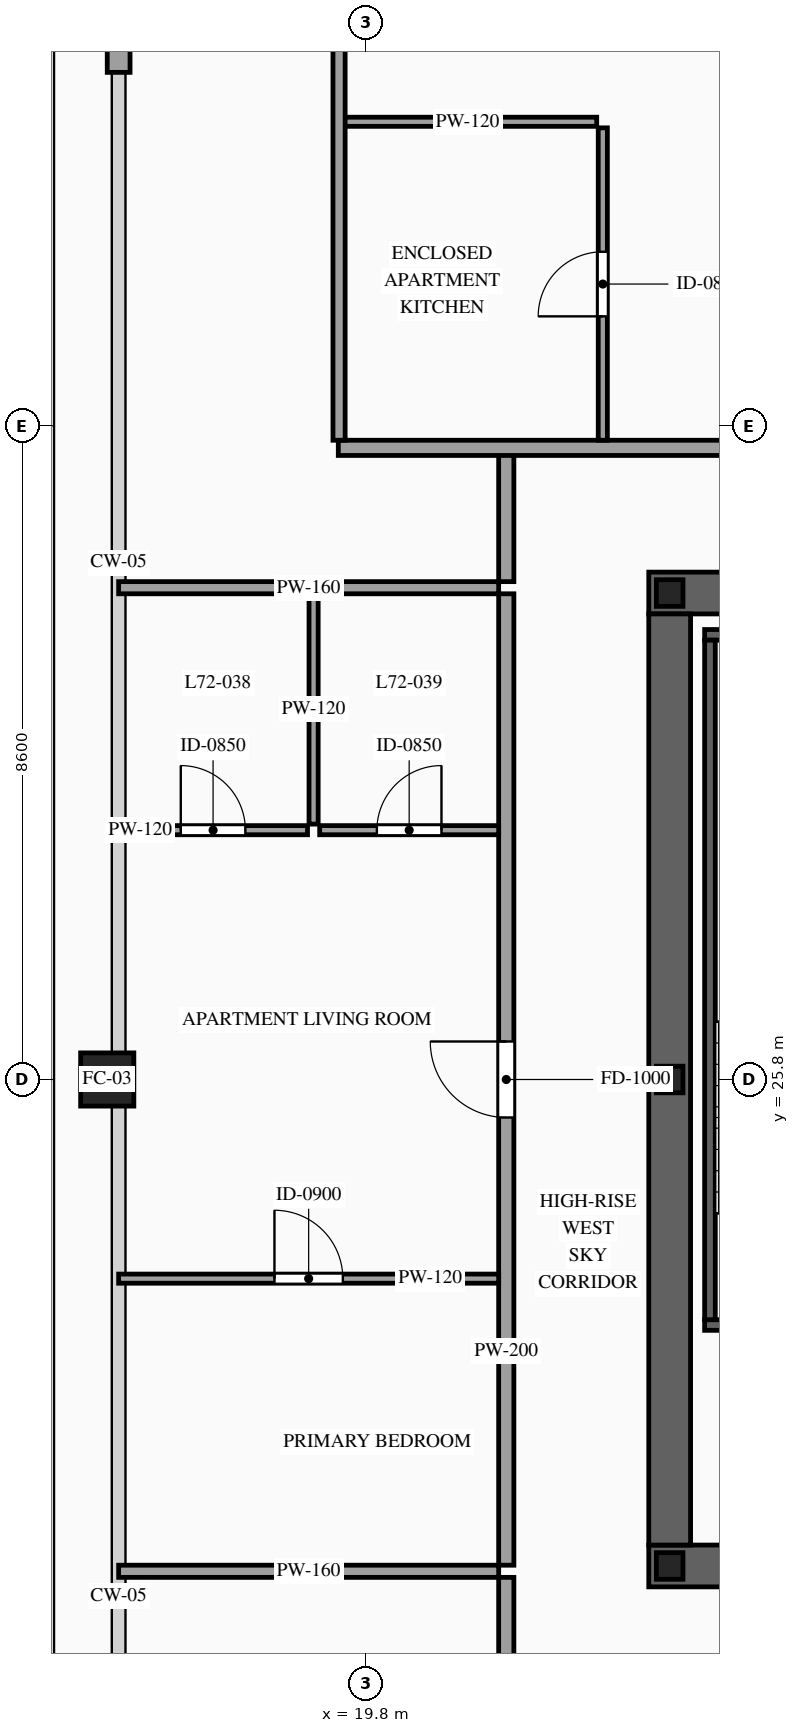
"""IFC4 building model, lengths in metres.
Left out: names, types, materials, properties, quantities, classifications, styles, units other than length and angle.
Written with IfcOpenShell. Run it as: python <this file> out.ifc"""

import sys

from ifc_helpers import new_model, si_unit, direction, frame, frame_2d, origin, origin_2d, place, context, subcontext, project, spatial, rectangle, hollow_rectangle, i_section, extrude, source, transform, mapped, element, fill, save


model = new_model("IFC4")
c1 = context("Model", 3, precision=1e-05, world=origin(), true_north=direction((0.0, 1.0)))
c2 = subcontext(c1, "Body", "Model", "MODEL_VIEW")
j1 = project(units=[si_unit("LENGTHUNIT", "METRE"), si_unit("PLANEANGLEUNIT", "RADIAN")], contexts=[c1])
p1 = place(None, origin())
s1 = spatial("IfcSite", under=j1, at=p1, CompositionType="ELEMENT")
p2 = place(p1, origin())
s2 = spatial("IfcBuilding", under=s1, at=p2, CompositionType="ELEMENT")
p3 = place(p2, frame((0.0, 0.0, 271.6)))
s3 = spatial("IfcBuildingStorey", under=s2, at=p3, CompositionType="ELEMENT", Elevation=271.6)
p4 = place(p3, frame((23.525, 19.4, 0.0), z_axis=(0.0, 0.0, 1.0), x_axis=(1.0, 0.0, 0.0)))
e1 = element("IfcWall", 1, at=p4, inside=s3, PredefinedType="SHEAR", context=c2, shape_type="SweptSolid", body=[
    extrude(rectangle(XDim=26.95, YDim=0.55, at=frame_2d((13.475, 0.0))), origin(), (0.0, 0.0, 1.0), 3.5),
])
p5 = place(p4, frame((1.925, 0.0, 0.0)))
e2 = element("IfcOpeningElement", 2, at=p5, cuts=e1, PredefinedType="OPENING", context=c2, shape_type="SweptSolid", body=[
    extrude(rectangle(XDim=1.1, YDim=2.2, at=frame_2d((0.55, 1.1))), frame((0.0, 0.29, 0.0), z_axis=(0.0, -1.0, 0.0), x_axis=(1.0, 0.0, 0.0)), (0.0, 0.0, 1.0), 0.58),
])
p6 = place(p4, frame((9.825, 0.0, 0.0)))
e3 = element("IfcOpeningElement", 3, at=p6, cuts=e1, PredefinedType="OPENING", context=c2, shape_type="SweptSolid", body=[
    extrude(rectangle(XDim=1.1, YDim=2.2, at=frame_2d((0.55, 1.1))), frame((0.0, 0.29, 0.0), z_axis=(0.0, -1.0, 0.0), x_axis=(1.0, 0.0, 0.0)), (0.0, 0.0, 1.0), 0.58),
])
p7 = place(p4, frame((23.025, 0.0, 0.0)))
e4 = element("IfcOpeningElement", 4, at=p7, cuts=e1, PredefinedType="OPENING", context=c2, shape_type="SweptSolid", body=[
    extrude(rectangle(XDim=1.1, YDim=2.2, at=frame_2d((0.55, 1.1))), frame((0.0, 0.29, 0.0), z_axis=(0.0, -1.0, 0.0), x_axis=(1.0, 0.0, 0.0)), (0.0, 0.0, 1.0), 0.58),
])
p8 = place(p4, frame((19.645, 0.0, 0.0)))
e5 = element("IfcOpeningElement", 5, at=p8, cuts=e1, PredefinedType="OPENING", context=c2, shape_type="SweptSolid", body=[
    extrude(rectangle(XDim=0.9, YDim=2.15, at=frame_2d((0.45, 1.075))), frame((0.0, 0.29, 0.0), z_axis=(0.0, -1.0, 0.0), x_axis=(1.0, 0.0, 0.0)), (0.0, 0.0, 1.0), 0.58),
])
p9 = place(p4, frame((18.205, 0.0, 0.0)))
e6 = element("IfcOpeningElement", 6, at=p9, cuts=e1, PredefinedType="OPENING", context=c2, shape_type="SweptSolid", body=[
    extrude(rectangle(XDim=0.9, YDim=2.15, at=frame_2d((0.45, 1.075))), frame((0.0, 0.29, 0.0), z_axis=(0.0, -1.0, 0.0), x_axis=(1.0, 0.0, 0.0)), (0.0, 0.0, 1.0), 0.58),
])
p10 = place(p3, frame((23.525, 32.2, 0.0), z_axis=(0.0, 0.0, 1.0), x_axis=(1.0, 0.0, 0.0)))
e7 = element("IfcWall", 7, at=p10, inside=s3, PredefinedType="SHEAR", context=c2, shape_type="SweptSolid", body=[
    extrude(rectangle(XDim=26.95, YDim=0.55, at=frame_2d((13.475, 0.0))), origin(), (0.0, 0.0, 1.0), 3.5),
])
p11 = place(p10, frame((4.545, 0.0, 0.0)))
e8 = element("IfcOpeningElement", 8, at=p11, cuts=e7, PredefinedType="OPENING", context=c2, shape_type="SweptSolid", body=[
    extrude(rectangle(XDim=0.9, YDim=2.15, at=frame_2d((0.45, 1.075))), frame((0.0, 0.29, 0.0), z_axis=(0.0, -1.0, 0.0), x_axis=(1.0, 0.0, 0.0)), (0.0, 0.0, 1.0), 0.58),
])
p12 = place(p10, frame((9.825, 0.0, 0.0)))
e9 = element("IfcOpeningElement", 9, at=p12, cuts=e7, PredefinedType="OPENING", context=c2, shape_type="SweptSolid", body=[
    extrude(rectangle(XDim=1.1, YDim=2.2, at=frame_2d((0.55, 1.1))), frame((0.0, 0.29, 0.0), z_axis=(0.0, -1.0, 0.0), x_axis=(1.0, 0.0, 0.0)), (0.0, 0.0, 1.0), 0.58),
])
p13 = place(p10, frame((15.675, 0.0, 0.0)))
e10 = element("IfcOpeningElement", 10, at=p13, cuts=e7, PredefinedType="OPENING", context=c2, shape_type="SweptSolid", body=[
    extrude(rectangle(XDim=1.1, YDim=2.2, at=frame_2d((0.55, 1.1))), frame((0.0, 0.29, 0.0), z_axis=(0.0, -1.0, 0.0), x_axis=(1.0, 0.0, 0.0)), (0.0, 0.0, 1.0), 0.58),
])
p14 = place(p10, frame((18.775, 0.0, 0.0)))
e11 = element("IfcOpeningElement", 11, at=p14, cuts=e7, PredefinedType="OPENING", context=c2, shape_type="SweptSolid", body=[
    extrude(rectangle(XDim=1.1, YDim=2.2, at=frame_2d((0.55, 1.1))), frame((0.0, 0.29, 0.0), z_axis=(0.0, -1.0, 0.0), x_axis=(1.0, 0.0, 0.0)), (0.0, 0.0, 1.0), 0.58),
])
m1 = source(origin(), c2, "Body", "SweptSolid", [
    extrude(rectangle(XDim=12.25, YDim=0.55, at=frame_2d((6.125, 0.0))), origin(), (0.0, 0.0, 1.0), 3.5),
])
p15 = place(p3, frame((23.8, 19.675, 0.0), z_axis=(0.0, 0.0, 1.0), x_axis=(0.0, 1.0, 0.0)))
e12 = element("IfcWall", 12, at=p15, inside=s3, PredefinedType="SHEAR", context=c2, shape_type="MappedRepresentation", body=[
    mapped(m1, transform((0.0, 0.0, 0.0), scale=1.0)),
])
m2 = source(origin(), c2, "Body", "SweptSolid", [
    extrude(i_section(OverallWidth=0.35, OverallDepth=0.35, WebThickness=0.012, FlangeThickness=0.019, at=origin_2d()), origin(), (0.0, 0.0, 1.0), 3.5),
])
for number, where, z_axis, x_axis in (
    (13, (23.8, 19.4, 0.0), (0.0, 0.0, 1.0), (1.0, 0.0, 0.0)),
    (14, (23.8, 25.8, 0.0), (0.0, 0.0, 1.0), (1.0, 0.0, 0.0)),
    (15, (23.8, 32.2, 0.0), (0.0, 0.0, 1.0), (1.0, 0.0, 0.0)),
):
    element("IfcColumn", number, at=place(p3, frame(where, z_axis=z_axis, x_axis=x_axis)), inside=s3, PredefinedType="COLUMN", context=c2, shape_type="MappedRepresentation", body=[
        mapped(m2, transform((0.0, 0.0, 0.0), scale=1.0)),
    ])
m3 = source(origin(), c2, "Body", "SweptSolid", [
    extrude(hollow_rectangle(XDim=0.7, YDim=0.7, WallThickness=0.032, at=origin_2d()), origin(), (0.0, 0.0, 1.0), 3.5),
])
p16 = place(p3, frame((16.4, 25.8, 0.0), z_axis=(0.0, 0.0, 1.0), x_axis=(1.0, 0.0, 0.0)))
e16 = element("IfcColumn", 16, at=p16, inside=s3, PredefinedType="COLUMN", context=c2, shape_type="MappedRepresentation", body=[
    mapped(m3, transform((0.0, 0.0, 0.0), scale=1.0)),
])
m4 = source(origin(), c2, "Body", "SweptSolid", [
    extrude(rectangle(XDim=3.15, YDim=0.3, at=frame_2d((1.575, 0.0))), origin(), (0.0, 0.0, 1.0), 2.835),
])
p17 = place(p3, frame((16.55, 39.05, 0.0), z_axis=(0.0, 0.0, 1.0), x_axis=(0.0, 1.0, 0.0)))
e17 = element("IfcWall", 17, at=p17, inside=s3, PredefinedType="SOLIDWALL", context=c2, shape_type="MappedRepresentation", body=[
    mapped(m4, transform((0.0, 0.0, 0.0), scale=1.0)),
])
p18 = place(p3, frame((24.26, 22.57, 0.0), z_axis=(0.0, 0.0, 1.0), x_axis=(1.0, 0.0, 0.0)))
e18 = element("IfcWall", 18, at=p18, inside=s3, PredefinedType="SOLIDWALL", context=c2, shape_type="SweptSolid", body=[
    extrude(rectangle(XDim=3.28, YDim=0.14, at=frame_2d((1.64, 0.0))), origin(), (0.0, 0.0, 1.0), 3.28),
])
p19 = place(p18, frame((1.09, 0.0, 0.0)))
e19 = element("IfcOpeningElement", 19, at=p19, cuts=e18, PredefinedType="OPENING", context=c2, shape_type="SweptSolid", body=[
    extrude(rectangle(XDim=1.1, YDim=2.2, at=frame_2d((0.55, 1.1))), frame((0.0, 0.085, 0.0), z_axis=(0.0, -1.0, 0.0), x_axis=(1.0, 0.0, 0.0)), (0.0, 0.0, 1.0), 0.17),
])
m5 = source(origin(), c2, "Body", "SweptSolid", [
    extrude(rectangle(XDim=3.28, YDim=0.14, at=frame_2d((1.64, 0.0))), origin(), (0.0, 0.0, 1.0), 3.28),
])
p20 = place(p3, frame((24.26, 31.65, 0.0), z_axis=(0.0, 0.0, 1.0), x_axis=(1.0, 0.0, 0.0)))
e20 = element("IfcWall", 20, at=p20, inside=s3, PredefinedType="SOLIDWALL", context=c2, shape_type="MappedRepresentation", body=[
    mapped(m5, transform((0.0, 0.0, 0.0), scale=1.0)),
])
m6 = source(origin(), c2, "Body", "SweptSolid", [
    extrude(rectangle(XDim=8.94, YDim=0.14, at=frame_2d((4.47, 0.0))), origin(), (0.0, 0.0, 1.0), 3.28),
])
p21 = place(p3, frame((24.33, 22.64, 0.0), z_axis=(0.0, 0.0, 1.0), x_axis=(0.0, 1.0, 0.0)))
e21 = element("IfcWall", 21, at=p21, inside=s3, PredefinedType="SOLIDWALL", context=c2, shape_type="MappedRepresentation", body=[
    mapped(m6, transform((0.0, 0.0, 0.0), scale=1.0)),
])
m7 = source(origin(), c2, "Body", "SweptSolid", [
    extrude(rectangle(XDim=1.7, YDim=0.2, at=frame_2d((0.85, 0.0))), origin(), (0.0, 0.0, 1.0), 3.28),
])
for number, where, z_axis, x_axis in (
    (22, (21.65, 32.35, 0.0), (0.0, 0.0, 1.0), (0.0, 1.0, 0.0)),
    (23, (21.65, 17.55, 0.0), (0.0, 0.0, 1.0), (0.0, 1.0, 0.0)),
):
    element("IfcWall", number, at=place(p3, frame(where, z_axis=z_axis, x_axis=x_axis)), inside=s3, PredefinedType="PARTITIONING", context=c2, shape_type="MappedRepresentation", body=[
        mapped(m7, transform((0.0, 0.0, 0.0), scale=1.0)),
    ])
p22 = place(p3, frame((19.44, 34.11, 0.0), z_axis=(0.0, 0.0, 1.0), x_axis=(1.0, 0.0, 0.0)))
e24 = element("IfcWall", 24, at=p22, inside=s3, PredefinedType="PARTITIONING", context=c2, shape_type="SweptSolid", body=[
    extrude(rectangle(XDim=17.48, YDim=0.2, at=frame_2d((8.74, 0.0))), origin(), (0.0, 0.0, 1.0), 3.28),
])
p23 = place(p22, frame((8.34, 0.0, 0.0)))
e25 = element("IfcOpeningElement", 25, at=p23, cuts=e24, PredefinedType="OPENING", context=c2, shape_type="SweptSolid", body=[
    extrude(rectangle(XDim=1.0, YDim=2.2, at=frame_2d((0.5, 1.1))), frame((0.0, 0.115, 0.0), z_axis=(0.0, -1.0, 0.0), x_axis=(1.0, 0.0, 0.0)), (0.0, 0.0, 1.0), 0.23),
])
m8 = source(origin(), c2, "Body", "SweptSolid", [
    extrude(rectangle(XDim=3.4, YDim=0.12, at=frame_2d((1.7, 0.0))), origin(), (0.0, 0.0, 1.0), 3.28),
])
p24 = place(p3, frame((19.44, 38.4, 0.0), z_axis=(0.0, 0.0, 1.0), x_axis=(1.0, 0.0, 0.0)))
e26 = element("IfcWall", 26, at=p24, inside=s3, PredefinedType="PARTITIONING", context=c2, shape_type="MappedRepresentation", body=[
    mapped(m8, transform((0.0, 0.0, 0.0), scale=1.0)),
])
p25 = place(p3, frame((22.92, 34.21, 0.0), z_axis=(0.0, 0.0, 1.0), x_axis=(0.0, 1.0, 0.0)))
e27 = element("IfcWall", 27, at=p25, inside=s3, PredefinedType="PARTITIONING", context=c2, shape_type="SweptSolid", body=[
    extrude(rectangle(XDim=4.11, YDim=0.12, at=frame_2d((2.055, 0.0))), origin(), (0.0, 0.0, 1.0), 3.28),
])
p26 = place(p25, frame((1.63, 0.0, 0.0)))
e28 = element("IfcOpeningElement", 28, at=p26, cuts=e27, PredefinedType="OPENING", context=c2, shape_type="SweptSolid", body=[
    extrude(rectangle(XDim=0.85, YDim=2.1, at=frame_2d((0.425, 1.05))), frame((0.0, 0.075, 0.0), z_axis=(0.0, -1.0, 0.0), x_axis=(1.0, 0.0, 0.0)), (0.0, 0.0, 1.0), 0.15),
])
m9 = source(origin(), c2, "Body", "SweptSolid", [
    extrude(rectangle(XDim=11.89, YDim=0.16, at=frame_2d((5.945, 0.0))), origin(), (0.0, 0.0, 1.0), 3.28),
])
p27 = place(p3, frame((19.45, 34.21, 0.0), z_axis=(0.0, 0.0, 1.0), x_axis=(0.0, 1.0, 0.0)))
e29 = element("IfcWall", 29, at=p27, inside=s3, PredefinedType="PARTITIONING", context=c2, shape_type="MappedRepresentation", body=[
    mapped(m9, transform((0.0, 0.0, 0.0), scale=1.0)),
])
p28 = place(p3, frame((21.65, 19.41, 0.0), z_axis=(0.0, 0.0, 1.0), x_axis=(0.0, 1.0, 0.0)))
e30 = element("IfcWall", 30, at=p28, inside=s3, PredefinedType="PARTITIONING", context=c2, shape_type="SweptSolid", body=[
    extrude(rectangle(XDim=12.78, YDim=0.2, at=frame_2d((6.39, 0.0))), origin(), (0.0, 0.0, 1.0), 3.28),
])
p29 = place(p28, frame((5.89, 0.0, 0.0)))
e31 = element("IfcOpeningElement", 31, at=p29, cuts=e30, PredefinedType="OPENING", context=c2, shape_type="SweptSolid", body=[
    extrude(rectangle(XDim=1.0, YDim=2.2, at=frame_2d((0.5, 1.1))), frame((0.0, 0.115, 0.0), z_axis=(0.0, -1.0, 0.0), x_axis=(1.0, 0.0, 0.0)), (0.0, 0.0, 1.0), 0.23),
])
m10 = source(origin(), c2, "Body", "SweptSolid", [
    extrude(rectangle(XDim=5.0, YDim=0.16, at=frame_2d((2.5, 0.0))), origin(), (0.0, 0.0, 1.0), 2.825),
])
for number, where, z_axis, x_axis in (
    (32, (16.55, 19.33, 0.0), (0.0, 0.0, 1.0), (1.0, 0.0, 0.0)),
    (33, (16.55, 32.27, 0.0), (0.0, 0.0, 1.0), (1.0, 0.0, 0.0)),
):
    element("IfcWall", number, at=place(p3, frame(where, z_axis=z_axis, x_axis=x_axis)), inside=s3, PredefinedType="PARTITIONING", context=c2, shape_type="MappedRepresentation", body=[
        mapped(m10, transform((0.0, 0.0, 0.0), scale=1.0)),
    ])
p30 = place(p3, frame((16.55, 29.08, 0.0), z_axis=(0.0, 0.0, 1.0), x_axis=(1.0, 0.0, 0.0)))
e34 = element("IfcWall", 34, at=p30, inside=s3, PredefinedType="PARTITIONING", context=c2, shape_type="SweptSolid", body=[
    extrude(rectangle(XDim=2.485, YDim=0.12, at=frame_2d((1.242, 0.0))), origin(), (0.0, 0.0, 1.0), 3.28),
])
p31 = place(p30, frame((0.817, 0.0, 0.0)))
e35 = element("IfcOpeningElement", 35, at=p31, cuts=e34, PredefinedType="OPENING", context=c2, shape_type="SweptSolid", body=[
    extrude(rectangle(XDim=0.85, YDim=2.1, at=frame_2d((0.425, 1.05))), frame((0.0, 0.075, 0.0), z_axis=(0.0, -1.0, 0.0), x_axis=(1.0, 0.0, 0.0)), (0.0, 0.0, 1.0), 0.15),
])
m11 = source(origin(), c2, "Body", "SweptSolid", [
    extrude(rectangle(XDim=3.03, YDim=0.12, at=frame_2d((1.515, 0.0))), origin(), (0.0, 0.0, 1.0), 3.28),
])
p32 = place(p3, frame((19.115, 29.16, 0.0), z_axis=(0.0, 0.0, 1.0), x_axis=(0.0, 1.0, 0.0)))
e36 = element("IfcWall", 36, at=p32, inside=s3, PredefinedType="PARTITIONING", context=c2, shape_type="MappedRepresentation", body=[
    mapped(m11, transform((0.0, 0.0, 0.0), scale=1.0)),
])
p33 = place(p3, frame((19.195, 29.08, 0.0), z_axis=(0.0, 0.0, 1.0), x_axis=(1.0, 0.0, 0.0)))
e37 = element("IfcWall", 37, at=p33, inside=s3, PredefinedType="PARTITIONING", context=c2, shape_type="SweptSolid", body=[
    extrude(rectangle(XDim=2.355, YDim=0.12, at=frame_2d((1.177, 0.0))), origin(), (0.0, 0.0, 1.0), 3.28),
])
p34 = place(p33, frame((0.752, 0.0, 0.0)))
e38 = element("IfcOpeningElement", 38, at=p34, cuts=e37, PredefinedType="OPENING", context=c2, shape_type="SweptSolid", body=[
    extrude(rectangle(XDim=0.85, YDim=2.1, at=frame_2d((0.425, 1.05))), frame((0.0, 0.075, 0.0), z_axis=(0.0, -1.0, 0.0), x_axis=(1.0, 0.0, 0.0)), (0.0, 0.0, 1.0), 0.15),
])
p35 = place(p3, frame((16.55, 23.18, 0.0), z_axis=(0.0, 0.0, 1.0), x_axis=(1.0, 0.0, 0.0)))
e39 = element("IfcWall", 39, at=p35, inside=s3, PredefinedType="PARTITIONING", context=c2, shape_type="SweptSolid", body=[
    extrude(rectangle(XDim=5.0, YDim=0.12, at=frame_2d((2.5, 0.0))), origin(), (0.0, 0.0, 1.0), 3.28),
])
p36 = place(p35, frame((2.05, 0.0, 0.0)))
e40 = element("IfcOpeningElement", 40, at=p36, cuts=e39, PredefinedType="OPENING", context=c2, shape_type="SweptSolid", body=[
    extrude(rectangle(XDim=0.9, YDim=2.15, at=frame_2d((0.45, 1.075))), frame((0.0, 0.075, 0.0), z_axis=(0.0, -1.0, 0.0), x_axis=(1.0, 0.0, 0.0)), (0.0, 0.0, 1.0), 0.15),
])
m12 = source(origin(), c2, "Body", "SweptSolid", [
    extrude(rectangle(XDim=0.85, YDim=2.1, at=frame_2d((0.425, 1.05))), frame((0.0, 0.025, 0.0), z_axis=(0.0, -1.0, 0.0), x_axis=(1.0, 0.0, 0.0)), (0.0, 0.0, 1.0), 0.05),
])
p37 = place(p26, origin())
e41 = element("IfcDoor", 41, at=p37, inside=s3, OperationType="SINGLE_SWING_LEFT", PredefinedType="DOOR", context=c2, shape_type="MappedRepresentation", body=[
    mapped(m12, transform((0.0, 0.0, 0.0), scale=1.0)),
])
fill(e28, e41)
m13 = source(origin(), c2, "Body", "SweptSolid", [
    extrude(rectangle(XDim=1.0, YDim=2.2, at=frame_2d((0.5, 1.1))), frame((0.0, 0.025, 0.0), z_axis=(0.0, -1.0, 0.0), x_axis=(1.0, 0.0, 0.0)), (0.0, 0.0, 1.0), 0.05),
])
p38 = place(p29, origin())
e42 = element("IfcDoor", 42, at=p38, inside=s3, OperationType="SINGLE_SWING_RIGHT", PredefinedType="DOOR", context=c2, shape_type="MappedRepresentation", body=[
    mapped(m13, transform((0.0, 0.0, 0.0), scale=1.0)),
])
fill(e31, e42)
p39 = place(p31, origin())
e43 = element("IfcDoor", 43, at=p39, inside=s3, OperationType="SINGLE_SWING_LEFT", PredefinedType="DOOR", context=c2, shape_type="MappedRepresentation", body=[
    mapped(m12, transform((0.0, 0.0, 0.0), scale=1.0)),
])
fill(e35, e43)
p40 = place(p34, origin())
e44 = element("IfcDoor", 44, at=p40, inside=s3, OperationType="SINGLE_SWING_RIGHT", PredefinedType="DOOR", context=c2, shape_type="MappedRepresentation", body=[
    mapped(m12, transform((0.0, 0.0, 0.0), scale=1.0)),
])
fill(e38, e44)
m14 = source(origin(), c2, "Body", "SweptSolid", [
    extrude(rectangle(XDim=0.9, YDim=2.15, at=frame_2d((0.45, 1.075))), frame((0.0, 0.025, 0.0), z_axis=(0.0, -1.0, 0.0), x_axis=(1.0, 0.0, 0.0)), (0.0, 0.0, 1.0), 0.05),
])
p41 = place(p36, origin())
e45 = element("IfcDoor", 45, at=p41, inside=s3, OperationType="SINGLE_SWING_LEFT", PredefinedType="DOOR", context=c2, shape_type="MappedRepresentation", body=[
    mapped(m14, transform((0.0, 0.0, 0.0), scale=1.0)),
])
fill(e40, e45)
save(model, sys.argv[1])
